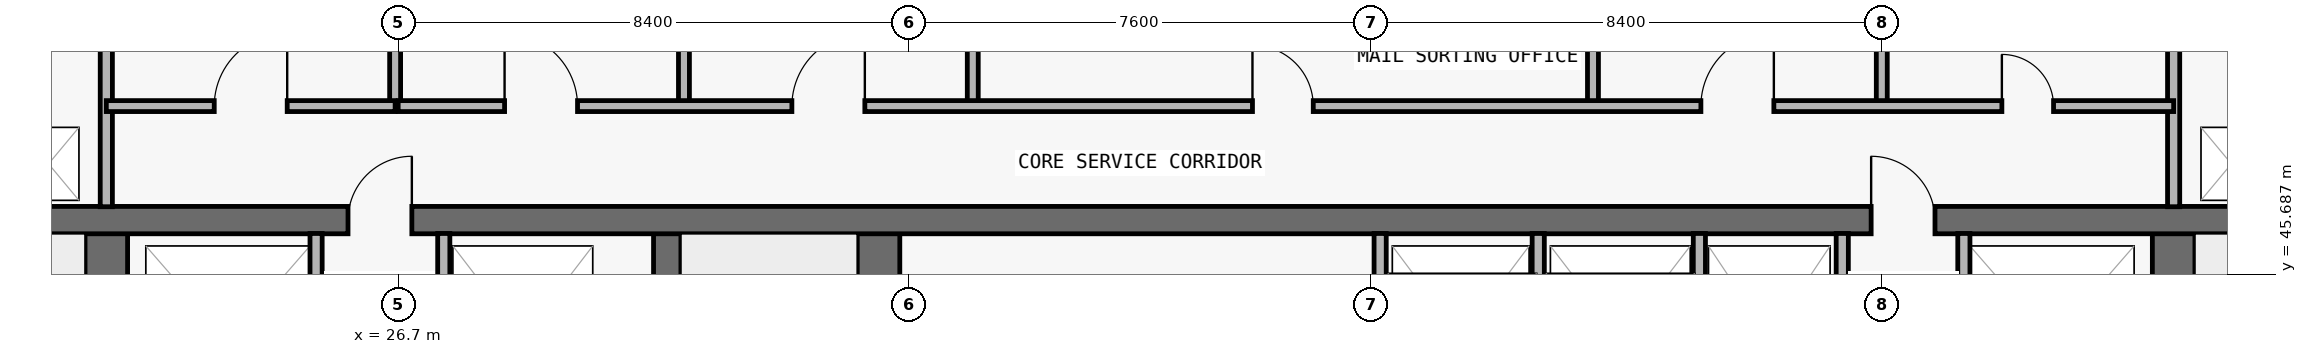
"""IFC4 building model, lengths in metres.
Left out: names, types, materials, properties, quantities, classifications, styles, units other than length and angle.
Written with IfcOpenShell. Run it as: python <this file> out.ifc"""

import sys

from ifc_helpers import new_model, si_unit, direction, frame, frame_2d, origin, place, context, subcontext, project, spatial, rectangle, extrude, element, fill, save


model = new_model("IFC4")
c1 = context("Model", 3, precision=1e-05, world=origin(), true_north=direction((0.0, 1.0)))
c2 = subcontext(c1, "Body", "Model", "MODEL_VIEW")
j1 = project(units=[si_unit("LENGTHUNIT", "METRE"), si_unit("PLANEANGLEUNIT", "RADIAN")], contexts=[c1])
p1 = place(None, origin())
s1 = spatial("IfcSite", under=j1, at=p1, CompositionType="ELEMENT")
p2 = place(p1, origin())
s2 = spatial("IfcBuilding", under=s1, at=p2, CompositionType="ELEMENT")
p3 = place(p2, frame((0.0, 0.0, 129.0)))
s3 = spatial("IfcBuildingStorey", under=s2, at=p3, CompositionType="ELEMENT", Elevation=129.0)
p4 = place(p3, frame((21.9, 36.95, 0.0), z_axis=(0.0, 0.0, 1.0), x_axis=(0.0, 1.0, 0.0)))
e1 = element("IfcWall", 1, at=p4, inside=s3, PredefinedType="SHEAR", context=c2, shape_type="SweptSolid", body=[
    extrude(rectangle(XDim=9.625, YDim=0.7, at=frame_2d((4.812, 0.0))), origin(), (0.0, 0.0, 1.0), 3.05),
])
p5 = place(p4, frame((0.6, 0.0, 0.0)))
e2 = element("IfcOpeningElement", 2, at=p5, cuts=e1, PredefinedType="OPENING", context=c2, shape_type="SweptSolid", body=[
    extrude(rectangle(XDim=1.1, YDim=2.15, at=frame_2d((0.55, 1.075))), frame((0.0, 0.36, 0.0), z_axis=(0.0, -1.0, 0.0), x_axis=(1.0, 0.0, 0.0)), (0.0, 0.0, 1.0), 0.72),
])
p6 = place(p3, frame((55.9, 36.95, 0.0), z_axis=(0.0, 0.0, 1.0), x_axis=(0.0, 1.0, 0.0)))
e3 = element("IfcWall", 3, at=p6, inside=s3, PredefinedType="SHEAR", context=c2, shape_type="SweptSolid", body=[
    extrude(rectangle(XDim=9.625, YDim=0.7, at=frame_2d((4.812, 0.0))), origin(), (0.0, 0.0, 1.0), 3.05),
])
p7 = place(p6, frame((0.6, 0.0, 0.0)))
e4 = element("IfcOpeningElement", 4, at=p7, cuts=e3, PredefinedType="OPENING", context=c2, shape_type="SweptSolid", body=[
    extrude(rectangle(XDim=1.1, YDim=2.15, at=frame_2d((0.55, 1.075))), frame((0.0, 0.36, 0.0), z_axis=(0.0, -1.0, 0.0), x_axis=(1.0, 0.0, 0.0)), (0.0, 0.0, 1.0), 0.72),
])
p8 = place(p3, frame((31.125, 36.95, 0.0), z_axis=(0.0, 0.0, 1.0), x_axis=(0.0, 1.0, 0.0)))
e5 = element("IfcWall", 5, at=p8, inside=s3, PredefinedType="SHEAR", context=c2, shape_type="SweptSolid", body=[
    extrude(rectangle(XDim=9.625, YDim=0.45, at=frame_2d((4.812, 0.0))), origin(), (0.0, 0.0, 1.0), 3.05),
])
p9 = place(p3, frame((34.6, 36.95, 0.0), z_axis=(0.0, 0.0, 1.0), x_axis=(0.0, 1.0, 0.0)))
e6 = element("IfcWall", 6, at=p9, inside=s3, PredefinedType="SHEAR", context=c2, shape_type="SweptSolid", body=[
    extrude(rectangle(XDim=9.625, YDim=0.7, at=frame_2d((4.812, 0.0))), origin(), (0.0, 0.0, 1.0), 3.05),
])
p10 = place(p3, frame((18.25, 46.575, 0.0), z_axis=(0.0, 0.0, 1.0), x_axis=(1.0, 0.0, 0.0)))
e7 = element("IfcWall", 7, at=p10, inside=s3, PredefinedType="SHEAR", context=c2, shape_type="SweptSolid", body=[
    extrude(rectangle(XDim=41.3, YDim=0.45, at=frame_2d((20.65, 0.0))), origin(), (0.0, 0.0, 1.0), 3.05),
])
p11 = place(p10, frame((7.625, 0.0, 0.0)))
e8 = element("IfcOpeningElement", 8, at=p11, cuts=e7, PredefinedType="OPENING", context=c2, shape_type="SweptSolid", body=[
    extrude(rectangle(XDim=1.05, YDim=2.15, at=frame_2d((0.525, 1.075))), frame((0.0, 0.235, 0.0), z_axis=(0.0, -1.0, 0.0), x_axis=(1.0, 0.0, 0.0)), (0.0, 0.0, 1.0), 0.47),
])
p12 = place(p10, frame((32.675, 0.0, 0.0)))
e9 = element("IfcOpeningElement", 9, at=p12, cuts=e7, PredefinedType="OPENING", context=c2, shape_type="SweptSolid", body=[
    extrude(rectangle(XDim=1.05, YDim=2.15, at=frame_2d((0.525, 1.075))), frame((0.0, 0.235, 0.0), z_axis=(0.0, -1.0, 0.0), x_axis=(1.0, 0.0, 0.0)), (0.0, 0.0, 1.0), 0.47),
])
p13 = place(p3, frame((21.9, 46.795, 0.0), z_axis=(0.0, 0.0, 1.0), x_axis=(0.0, 1.0, 0.0)))
e10 = element("IfcWall", 10, at=p13, inside=s3, PredefinedType="PARTITIONING", context=c2, shape_type="SweptSolid", body=[
    extrude(rectangle(XDim=3.16, YDim=0.2, at=frame_2d((1.58, 0.0))), origin(), (0.0, 0.0, 1.0), 3.05),
])
p14 = place(p3, frame((25.35, 43.17, 0.0), z_axis=(0.0, 0.0, 1.0), x_axis=(0.0, 1.0, 0.0)))
e11 = element("IfcWall", 11, at=p14, inside=s3, PredefinedType="PARTITIONING", context=c2, shape_type="SweptSolid", body=[
    extrude(rectangle(XDim=3.185, YDim=0.2, at=frame_2d((1.593, 0.0))), origin(), (0.0, 0.0, 1.0), 3.05),
])
p15 = place(p3, frame((26.65, 48.45, 0.0), z_axis=(0.0, 0.0, 1.0), x_axis=(0.0, 1.0, 0.0)))
e12 = element("IfcWall", 12, at=p15, inside=s3, PredefinedType="PARTITIONING", context=c2, shape_type="SweptSolid", body=[
    extrude(rectangle(XDim=1.505, YDim=0.18, at=frame_2d((0.752, 0.0))), origin(), (0.0, 0.0, 1.0), 3.05),
])
p16 = place(p3, frame((27.45, 43.17, 0.0), z_axis=(0.0, 0.0, 1.0), x_axis=(0.0, 1.0, 0.0)))
e13 = element("IfcWall", 13, at=p16, inside=s3, PredefinedType="PARTITIONING", context=c2, shape_type="SweptSolid", body=[
    extrude(rectangle(XDim=3.185, YDim=0.2, at=frame_2d((1.593, 0.0))), origin(), (0.0, 0.0, 1.0), 3.05),
])
for number, where, z_axis, x_axis in (
    (14, (31.4, 48.45, 0.0), (0.0, 0.0, 1.0), (0.0, 1.0, 0.0)),
    (15, (36.15, 48.45, 0.0), (0.0, 0.0, 1.0), (0.0, 1.0, 0.0)),
):
    element("IfcWall", number, at=place(p3, frame(where, z_axis=z_axis, x_axis=x_axis)), inside=s3, PredefinedType="PARTITIONING", context=c2, shape_type="SweptSolid", body=[
        extrude(rectangle(XDim=1.505, YDim=0.18, at=frame_2d((0.752, 0.0))), origin(), (0.0, 0.0, 1.0), 3.05),
    ])
for number, where, z_axis, x_axis in (
    (16, (42.85, 43.17, 0.0), (0.0, 0.0, 1.0), (0.0, 1.0, 0.0)),
    (17, (45.45, 43.17, 0.0), (0.0, 0.0, 1.0), (0.0, 1.0, 0.0)),
):
    element("IfcWall", number, at=place(p3, frame(where, z_axis=z_axis, x_axis=x_axis)), inside=s3, PredefinedType="PARTITIONING", context=c2, shape_type="SweptSolid", body=[
        extrude(rectangle(XDim=3.185, YDim=0.2, at=frame_2d((1.593, 0.0))), origin(), (0.0, 0.0, 1.0), 3.05),
    ])
p17 = place(p3, frame((46.35, 48.45, 0.0), z_axis=(0.0, 0.0, 1.0), x_axis=(0.0, 1.0, 0.0)))
e18 = element("IfcWall", 18, at=p17, inside=s3, PredefinedType="PARTITIONING", context=c2, shape_type="SweptSolid", body=[
    extrude(rectangle(XDim=1.505, YDim=0.18, at=frame_2d((0.752, 0.0))), origin(), (0.0, 0.0, 1.0), 3.05),
])
for number, where, z_axis, x_axis in (
    (19, (48.1, 43.17, 0.0), (0.0, 0.0, 1.0), (0.0, 1.0, 0.0)),
    (20, (50.45, 43.17, 0.0), (0.0, 0.0, 1.0), (0.0, 1.0, 0.0)),
):
    element("IfcWall", number, at=place(p3, frame(where, z_axis=z_axis, x_axis=x_axis)), inside=s3, PredefinedType="PARTITIONING", context=c2, shape_type="SweptSolid", body=[
        extrude(rectangle(XDim=3.185, YDim=0.2, at=frame_2d((1.593, 0.0))), origin(), (0.0, 0.0, 1.0), 3.05),
    ])
p18 = place(p3, frame((51.1, 48.45, 0.0), z_axis=(0.0, 0.0, 1.0), x_axis=(0.0, 1.0, 0.0)))
e21 = element("IfcWall", 21, at=p18, inside=s3, PredefinedType="PARTITIONING", context=c2, shape_type="SweptSolid", body=[
    extrude(rectangle(XDim=1.505, YDim=0.18, at=frame_2d((0.752, 0.0))), origin(), (0.0, 0.0, 1.0), 3.05),
])
p19 = place(p3, frame((52.45, 43.17, 0.0), z_axis=(0.0, 0.0, 1.0), x_axis=(0.0, 1.0, 0.0)))
e22 = element("IfcWall", 22, at=p19, inside=s3, PredefinedType="PARTITIONING", context=c2, shape_type="SweptSolid", body=[
    extrude(rectangle(XDim=3.185, YDim=0.2, at=frame_2d((1.593, 0.0))), origin(), (0.0, 0.0, 1.0), 3.05),
])
p20 = place(p3, frame((55.9, 46.795, 0.0), z_axis=(0.0, 0.0, 1.0), x_axis=(0.0, 1.0, 0.0)))
e23 = element("IfcWall", 23, at=p20, inside=s3, PredefinedType="PARTITIONING", context=c2, shape_type="SweptSolid", body=[
    extrude(rectangle(XDim=3.16, YDim=0.2, at=frame_2d((1.58, 0.0))), origin(), (0.0, 0.0, 1.0), 3.05),
])
p21 = place(p3, frame((21.9, 48.45, 0.0), z_axis=(0.0, 0.0, 1.0), x_axis=(1.0, 0.0, 0.0)))
e24 = element("IfcWall", 24, at=p21, inside=s3, PredefinedType="PARTITIONING", context=c2, shape_type="SweptSolid", body=[
    extrude(rectangle(XDim=4.75, YDim=0.18, at=frame_2d((2.375, 0.0))), origin(), (0.0, 0.0, 1.0), 3.05),
])
p22 = place(p21, frame((1.775, 0.0, 0.0)))
e25 = element("IfcOpeningElement", 25, at=p22, cuts=e24, PredefinedType="OPENING", context=c2, shape_type="SweptSolid", body=[
    extrude(rectangle(XDim=1.2, YDim=2.2, at=frame_2d((0.6, 1.1))), frame((0.0, 0.1, 0.0), z_axis=(0.0, -1.0, 0.0), x_axis=(1.0, 0.0, 0.0)), (0.0, 0.0, 1.0), 0.2),
])
p23 = place(p3, frame((26.7, 48.45, 0.0), z_axis=(0.0, 0.0, 1.0), x_axis=(1.0, 0.0, 0.0)))
e26 = element("IfcWall", 26, at=p23, inside=s3, PredefinedType="PARTITIONING", context=c2, shape_type="SweptSolid", body=[
    extrude(rectangle(XDim=29.2, YDim=0.18, at=frame_2d((14.6, 0.0))), origin(), (0.0, 0.0, 1.0), 3.05),
])
p24 = place(p23, frame((1.75, 0.0, 0.0)))
e27 = element("IfcOpeningElement", 27, at=p24, cuts=e26, PredefinedType="OPENING", context=c2, shape_type="SweptSolid", body=[
    extrude(rectangle(XDim=1.2, YDim=2.2, at=frame_2d((0.6, 1.1))), frame((0.0, 0.1, 0.0), z_axis=(0.0, -1.0, 0.0), x_axis=(1.0, 0.0, 0.0)), (0.0, 0.0, 1.0), 0.2),
])
p25 = place(p23, frame((6.475, 0.0, 0.0)))
e28 = element("IfcOpeningElement", 28, at=p25, cuts=e26, PredefinedType="OPENING", context=c2, shape_type="SweptSolid", body=[
    extrude(rectangle(XDim=1.2, YDim=2.2, at=frame_2d((0.6, 1.1))), frame((0.0, 0.1, 0.0), z_axis=(0.0, -1.0, 0.0), x_axis=(1.0, 0.0, 0.0)), (0.0, 0.0, 1.0), 0.2),
])
p26 = place(p23, frame((14.05, 0.0, 0.0)))
e29 = element("IfcOpeningElement", 29, at=p26, cuts=e26, PredefinedType="OPENING", context=c2, shape_type="SweptSolid", body=[
    extrude(rectangle(XDim=1.0, YDim=2.2, at=frame_2d((0.5, 1.1))), frame((0.0, 0.1, 0.0), z_axis=(0.0, -1.0, 0.0), x_axis=(1.0, 0.0, 0.0)), (0.0, 0.0, 1.0), 0.2),
])
p27 = place(p23, frame((21.425, 0.0, 0.0)))
e30 = element("IfcOpeningElement", 30, at=p27, cuts=e26, PredefinedType="OPENING", context=c2, shape_type="SweptSolid", body=[
    extrude(rectangle(XDim=1.2, YDim=2.2, at=frame_2d((0.6, 1.1))), frame((0.0, 0.1, 0.0), z_axis=(0.0, -1.0, 0.0), x_axis=(1.0, 0.0, 0.0)), (0.0, 0.0, 1.0), 0.2),
])
p28 = place(p23, frame((26.375, 0.0, 0.0)))
e31 = element("IfcOpeningElement", 31, at=p28, cuts=e26, PredefinedType="OPENING", context=c2, shape_type="SweptSolid", body=[
    extrude(rectangle(XDim=0.85, YDim=2.1, at=frame_2d((0.425, 1.05))), frame((0.0, 0.1, 0.0), z_axis=(0.0, -1.0, 0.0), x_axis=(1.0, 0.0, 0.0)), (0.0, 0.0, 1.0), 0.2),
])
p29 = place(p11, origin())
e32 = element("IfcDoor", 32, at=p29, inside=s3, OperationType="SINGLE_SWING_RIGHT", PredefinedType="DOOR", context=c2, shape_type="SweptSolid", body=[
    extrude(rectangle(XDim=1.05, YDim=2.15, at=frame_2d((0.525, 1.075))), frame((0.0, 0.025, 0.0), z_axis=(0.0, -1.0, 0.0), x_axis=(1.0, 0.0, 0.0)), (0.0, 0.0, 1.0), 0.05),
])
fill(e8, e32)
p30 = place(p12, origin())
e33 = element("IfcDoor", 33, at=p30, inside=s3, OperationType="SINGLE_SWING_LEFT", PredefinedType="DOOR", context=c2, shape_type="SweptSolid", body=[
    extrude(rectangle(XDim=1.05, YDim=2.15, at=frame_2d((0.525, 1.075))), frame((0.0, 0.025, 0.0), z_axis=(0.0, -1.0, 0.0), x_axis=(1.0, 0.0, 0.0)), (0.0, 0.0, 1.0), 0.05),
])
fill(e9, e33)
p31 = place(p22, origin())
e34 = element("IfcDoor", 34, at=p31, inside=s3, OperationType="SINGLE_SWING_RIGHT", PredefinedType="DOOR", context=c2, shape_type="SweptSolid", body=[
    extrude(rectangle(XDim=1.2, YDim=2.2, at=frame_2d((0.6, 1.1))), frame((0.0, 0.025, 0.0), z_axis=(0.0, -1.0, 0.0), x_axis=(1.0, 0.0, 0.0)), (0.0, 0.0, 1.0), 0.05),
])
fill(e25, e34)
p32 = place(p24, origin())
e35 = element("IfcDoor", 35, at=p32, inside=s3, OperationType="SINGLE_SWING_LEFT", PredefinedType="DOOR", context=c2, shape_type="SweptSolid", body=[
    extrude(rectangle(XDim=1.2, YDim=2.2, at=frame_2d((0.6, 1.1))), frame((0.0, 0.025, 0.0), z_axis=(0.0, -1.0, 0.0), x_axis=(1.0, 0.0, 0.0)), (0.0, 0.0, 1.0), 0.05),
])
fill(e27, e35)
p33 = place(p25, origin())
e36 = element("IfcDoor", 36, at=p33, inside=s3, OperationType="SINGLE_SWING_RIGHT", PredefinedType="DOOR", context=c2, shape_type="SweptSolid", body=[
    extrude(rectangle(XDim=1.2, YDim=2.2, at=frame_2d((0.6, 1.1))), frame((0.0, 0.025, 0.0), z_axis=(0.0, -1.0, 0.0), x_axis=(1.0, 0.0, 0.0)), (0.0, 0.0, 1.0), 0.05),
])
fill(e28, e36)
p34 = place(p26, origin())
e37 = element("IfcDoor", 37, at=p34, inside=s3, OperationType="SINGLE_SWING_LEFT", PredefinedType="DOOR", context=c2, shape_type="SweptSolid", body=[
    extrude(rectangle(XDim=1.0, YDim=2.2, at=frame_2d((0.5, 1.1))), frame((0.0, 0.025, 0.0), z_axis=(0.0, -1.0, 0.0), x_axis=(1.0, 0.0, 0.0)), (0.0, 0.0, 1.0), 0.05),
])
fill(e29, e37)
p35 = place(p27, origin())
e38 = element("IfcDoor", 38, at=p35, inside=s3, OperationType="SINGLE_SWING_RIGHT", PredefinedType="DOOR", context=c2, shape_type="SweptSolid", body=[
    extrude(rectangle(XDim=1.2, YDim=2.2, at=frame_2d((0.6, 1.1))), frame((0.0, 0.025, 0.0), z_axis=(0.0, -1.0, 0.0), x_axis=(1.0, 0.0, 0.0)), (0.0, 0.0, 1.0), 0.05),
])
fill(e30, e38)
p36 = place(p28, origin())
e39 = element("IfcDoor", 39, at=p36, inside=s3, OperationType="SINGLE_SWING_LEFT", PredefinedType="DOOR", context=c2, shape_type="SweptSolid", body=[
    extrude(rectangle(XDim=0.85, YDim=2.1, at=frame_2d((0.425, 1.05))), frame((0.0, 0.025, 0.0), z_axis=(0.0, -1.0, 0.0), x_axis=(1.0, 0.0, 0.0)), (0.0, 0.0, 1.0), 0.05),
])
fill(e31, e39)
save(model, sys.argv[1])
